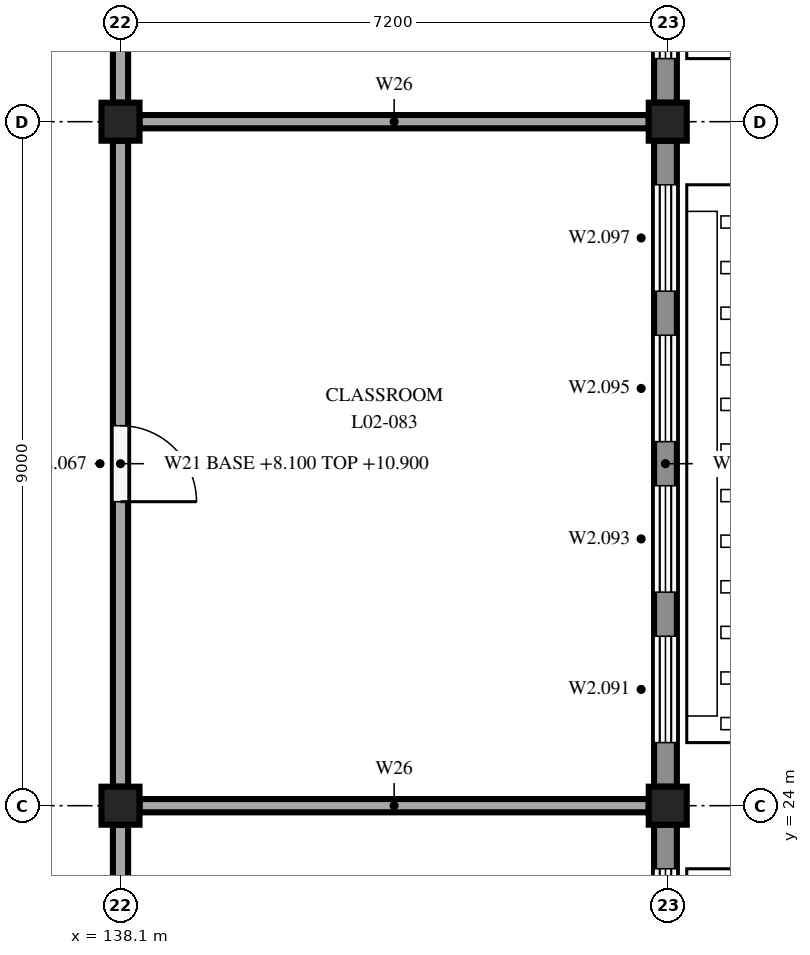
"""IFC4 building model, lengths in metres.
Left out: names, types, materials, properties, quantities, classifications, styles, units other than length and angle.
Written with IfcOpenShell. Run it as: python <this file> out.ifc"""

import sys

from ifc_helpers import new_model, si_unit, direction, frame, frame_2d, origin, origin_2d, place, context, subcontext, project, spatial, rectangle, extrude, element, fill, save


model = new_model("IFC4")
c1 = context("Model", 3, precision=1e-05, world=origin(), true_north=direction((0.0, 1.0)))
c2 = subcontext(c1, "Body", "Model", "MODEL_VIEW")
j1 = project(units=[si_unit("LENGTHUNIT", "METRE"), si_unit("PLANEANGLEUNIT", "RADIAN")], contexts=[c1])
p1 = place(None, origin())
s1 = spatial("IfcSite", under=j1, at=p1, CompositionType="ELEMENT")
p2 = place(p1, origin())
s2 = spatial("IfcBuilding", under=s1, at=p2, CompositionType="ELEMENT")
p3 = place(p2, frame((0.0, 0.0, 8.1)))
s3 = spatial("IfcBuildingStorey", under=s2, at=p3, CompositionType="ELEMENT", Elevation=8.1)
for number, where, z_axis, x_axis in (
    (1, (138.1, 24.0, 0.0), (0.0, 0.0, 1.0), (1.0, 0.0, 0.0)),
    (2, (138.1, 33.0, 0.0), (0.0, 0.0, 1.0), (1.0, 0.0, 0.0)),
    (3, (145.3, 24.0, 0.0), (0.0, 0.0, 1.0), (1.0, 0.0, 0.0)),
    (4, (145.3, 33.0, 0.0), (0.0, 0.0, 1.0), (1.0, 0.0, 0.0)),
):
    element("IfcColumn", number, at=place(p3, frame(where, z_axis=z_axis, x_axis=x_axis)), inside=s3, PredefinedType="COLUMN", context=c2, shape_type="SweptSolid", body=[
        extrude(rectangle(XDim=0.5, YDim=0.5, at=origin_2d()), origin(), (0.0, 0.0, 1.0), 3.3),
    ])
p4 = place(p3, frame((145.27, 23.75, 0.0), z_axis=(0.0, 0.0, 1.0), x_axis=(0.0, -1.0, 0.0)))
e5 = element("IfcWall", 5, at=p4, inside=s3, PredefinedType="STANDARD", context=c2, shape_type="SweptSolid", body=[
    extrude(rectangle(XDim=8.5, YDim=0.3, at=frame_2d((4.25, 0.0))), origin(), (0.0, 0.0, 1.0), 2.75),
])
p5 = place(p4, frame((6.52, 0.0, 0.6)))
e6 = element("IfcOpeningElement", 6, at=p5, cuts=e5, PredefinedType="OPENING", context=c2, shape_type="SweptSolid", body=[
    extrude(rectangle(XDim=1.4, YDim=2.1, at=frame_2d((0.7, 1.05))), frame((0.0, 0.16, 0.0), z_axis=(0.0, -1.0, 0.0), x_axis=(1.0, 0.0, 0.0)), (0.0, 0.0, 1.0), 0.32),
])
p6 = place(p4, frame((4.54, 0.0, 0.6)))
e7 = element("IfcOpeningElement", 7, at=p6, cuts=e5, PredefinedType="OPENING", context=c2, shape_type="SweptSolid", body=[
    extrude(rectangle(XDim=1.4, YDim=2.1, at=frame_2d((0.7, 1.05))), frame((0.0, 0.16, 0.0), z_axis=(0.0, -1.0, 0.0), x_axis=(1.0, 0.0, 0.0)), (0.0, 0.0, 1.0), 0.32),
])
p7 = place(p4, frame((2.56, 0.0, 0.6)))
e8 = element("IfcOpeningElement", 8, at=p7, cuts=e5, PredefinedType="OPENING", context=c2, shape_type="SweptSolid", body=[
    extrude(rectangle(XDim=1.4, YDim=2.1, at=frame_2d((0.7, 1.05))), frame((0.0, 0.16, 0.0), z_axis=(0.0, -1.0, 0.0), x_axis=(1.0, 0.0, 0.0)), (0.0, 0.0, 1.0), 0.32),
])
p8 = place(p4, frame((0.58, 0.0, 0.6)))
e9 = element("IfcOpeningElement", 9, at=p8, cuts=e5, PredefinedType="OPENING", context=c2, shape_type="SweptSolid", body=[
    extrude(rectangle(XDim=1.4, YDim=2.1, at=frame_2d((0.7, 1.05))), frame((0.0, 0.16, 0.0), z_axis=(0.0, -1.0, 0.0), x_axis=(1.0, 0.0, 0.0)), (0.0, 0.0, 1.0), 0.32),
])
p9 = place(p3, frame((145.27, 32.75, 0.0), z_axis=(0.0, 0.0, 1.0), x_axis=(0.0, -1.0, 0.0)))
e10 = element("IfcWall", 10, at=p9, inside=s3, PredefinedType="STANDARD", context=c2, shape_type="SweptSolid", body=[
    extrude(rectangle(XDim=8.5, YDim=0.3, at=frame_2d((4.25, 0.0))), origin(), (0.0, 0.0, 1.0), 2.75),
])
p10 = place(p9, frame((6.52, 0.0, 0.6)))
e11 = element("IfcOpeningElement", 11, at=p10, cuts=e10, PredefinedType="OPENING", context=c2, shape_type="SweptSolid", body=[
    extrude(rectangle(XDim=1.4, YDim=2.1, at=frame_2d((0.7, 1.05))), frame((0.0, 0.16, 0.0), z_axis=(0.0, -1.0, 0.0), x_axis=(1.0, 0.0, 0.0)), (0.0, 0.0, 1.0), 0.32),
])
p11 = place(p9, frame((4.54, 0.0, 0.6)))
e12 = element("IfcOpeningElement", 12, at=p11, cuts=e10, PredefinedType="OPENING", context=c2, shape_type="SweptSolid", body=[
    extrude(rectangle(XDim=1.4, YDim=2.1, at=frame_2d((0.7, 1.05))), frame((0.0, 0.16, 0.0), z_axis=(0.0, -1.0, 0.0), x_axis=(1.0, 0.0, 0.0)), (0.0, 0.0, 1.0), 0.32),
])
p12 = place(p9, frame((2.56, 0.0, 0.6)))
e13 = element("IfcOpeningElement", 13, at=p12, cuts=e10, PredefinedType="OPENING", context=c2, shape_type="SweptSolid", body=[
    extrude(rectangle(XDim=1.4, YDim=2.1, at=frame_2d((0.7, 1.05))), frame((0.0, 0.16, 0.0), z_axis=(0.0, -1.0, 0.0), x_axis=(1.0, 0.0, 0.0)), (0.0, 0.0, 1.0), 0.32),
])
p13 = place(p9, frame((0.58, 0.0, 0.6)))
e14 = element("IfcOpeningElement", 14, at=p13, cuts=e10, PredefinedType="OPENING", context=c2, shape_type="SweptSolid", body=[
    extrude(rectangle(XDim=1.4, YDim=2.1, at=frame_2d((0.7, 1.05))), frame((0.0, 0.16, 0.0), z_axis=(0.0, -1.0, 0.0), x_axis=(1.0, 0.0, 0.0)), (0.0, 0.0, 1.0), 0.32),
])
p14 = place(p3, frame((145.27, 41.75, 0.0), z_axis=(0.0, 0.0, 1.0), x_axis=(0.0, -1.0, 0.0)))
e15 = element("IfcWall", 15, at=p14, inside=s3, PredefinedType="STANDARD", context=c2, shape_type="SweptSolid", body=[
    extrude(rectangle(XDim=8.5, YDim=0.3, at=frame_2d((4.25, 0.0))), origin(), (0.0, 0.0, 1.0), 2.75),
])
p15 = place(p14, frame((6.52, 0.0, 0.6)))
e16 = element("IfcOpeningElement", 16, at=p15, cuts=e15, PredefinedType="OPENING", context=c2, shape_type="SweptSolid", body=[
    extrude(rectangle(XDim=1.4, YDim=2.1, at=frame_2d((0.7, 1.05))), frame((0.0, 0.16, 0.0), z_axis=(0.0, -1.0, 0.0), x_axis=(1.0, 0.0, 0.0)), (0.0, 0.0, 1.0), 0.32),
])
p16 = place(p14, frame((4.54, 0.0, 0.6)))
e17 = element("IfcOpeningElement", 17, at=p16, cuts=e15, PredefinedType="OPENING", context=c2, shape_type="SweptSolid", body=[
    extrude(rectangle(XDim=1.4, YDim=2.1, at=frame_2d((0.7, 1.05))), frame((0.0, 0.16, 0.0), z_axis=(0.0, -1.0, 0.0), x_axis=(1.0, 0.0, 0.0)), (0.0, 0.0, 1.0), 0.32),
])
p17 = place(p14, frame((2.56, 0.0, 0.6)))
e18 = element("IfcOpeningElement", 18, at=p17, cuts=e15, PredefinedType="OPENING", context=c2, shape_type="SweptSolid", body=[
    extrude(rectangle(XDim=1.4, YDim=2.1, at=frame_2d((0.7, 1.05))), frame((0.0, 0.16, 0.0), z_axis=(0.0, -1.0, 0.0), x_axis=(1.0, 0.0, 0.0)), (0.0, 0.0, 1.0), 0.32),
])
p18 = place(p14, frame((0.58, 0.0, 0.6)))
e19 = element("IfcOpeningElement", 19, at=p18, cuts=e15, PredefinedType="OPENING", context=c2, shape_type="SweptSolid", body=[
    extrude(rectangle(XDim=1.4, YDim=2.1, at=frame_2d((0.7, 1.05))), frame((0.0, 0.16, 0.0), z_axis=(0.0, -1.0, 0.0), x_axis=(1.0, 0.0, 0.0)), (0.0, 0.0, 1.0), 0.32),
])
p19 = place(p3, frame((138.1, 23.75, 0.0), z_axis=(0.0, 0.0, 1.0), x_axis=(0.0, -1.0, 0.0)))
e20 = element("IfcWall", 20, at=p19, inside=s3, PredefinedType="PARTITIONING", context=c2, shape_type="SweptSolid", body=[
    extrude(rectangle(XDim=8.5, YDim=0.2, at=frame_2d((4.25, 0.0))), origin(), (0.0, 0.0, 1.0), 2.8),
])
p20 = place(p19, frame((3.75, 0.0, 0.0)))
e21 = element("IfcOpeningElement", 21, at=p20, cuts=e20, PredefinedType="OPENING", context=c2, shape_type="SweptSolid", body=[
    extrude(rectangle(XDim=1.0, YDim=2.1, at=frame_2d((0.5, 1.05))), frame((0.0, 0.11, 0.0), z_axis=(0.0, -1.0, 0.0), x_axis=(1.0, 0.0, 0.0)), (0.0, 0.0, 1.0), 0.22),
])
p21 = place(p3, frame((138.1, 32.75, 0.0), z_axis=(0.0, 0.0, 1.0), x_axis=(0.0, -1.0, 0.0)))
e22 = element("IfcWall", 22, at=p21, inside=s3, PredefinedType="PARTITIONING", context=c2, shape_type="SweptSolid", body=[
    extrude(rectangle(XDim=8.5, YDim=0.2, at=frame_2d((4.25, 0.0))), origin(), (0.0, 0.0, 1.0), 2.8),
])
p22 = place(p21, frame((3.75, 0.0, 0.0)))
e23 = element("IfcOpeningElement", 23, at=p22, cuts=e22, PredefinedType="OPENING", context=c2, shape_type="SweptSolid", body=[
    extrude(rectangle(XDim=1.0, YDim=2.1, at=frame_2d((0.5, 1.05))), frame((0.0, 0.11, 0.0), z_axis=(0.0, -1.0, 0.0), x_axis=(1.0, 0.0, 0.0)), (0.0, 0.0, 1.0), 0.22),
])
p23 = place(p3, frame((138.1, 41.75, 0.0), z_axis=(0.0, 0.0, 1.0), x_axis=(0.0, -1.0, 0.0)))
e24 = element("IfcWall", 24, at=p23, inside=s3, PredefinedType="PARTITIONING", context=c2, shape_type="SweptSolid", body=[
    extrude(rectangle(XDim=8.5, YDim=0.2, at=frame_2d((4.25, 0.0))), origin(), (0.0, 0.0, 1.0), 2.8),
])
p24 = place(p23, frame((5.919, 0.0, 0.0)))
e25 = element("IfcOpeningElement", 25, at=p24, cuts=e24, PredefinedType="OPENING", context=c2, shape_type="SweptSolid", body=[
    extrude(rectangle(XDim=1.0, YDim=2.1, at=frame_2d((0.5, 1.05))), frame((0.0, 0.11, 0.0), z_axis=(0.0, -1.0, 0.0), x_axis=(1.0, 0.0, 0.0)), (0.0, 0.0, 1.0), 0.22),
])
p25 = place(p23, frame((1.581, 0.0, 0.0)))
e26 = element("IfcOpeningElement", 26, at=p25, cuts=e24, PredefinedType="OPENING", context=c2, shape_type="SweptSolid", body=[
    extrude(rectangle(XDim=1.0, YDim=2.1, at=frame_2d((0.5, 1.05))), frame((0.0, 0.11, 0.0), z_axis=(0.0, -1.0, 0.0), x_axis=(1.0, 0.0, 0.0)), (0.0, 0.0, 1.0), 0.22),
])
for number, where, z_axis, x_axis in (
    (27, (138.35, 24.0, 0.0), (0.0, 0.0, 1.0), (1.0, 0.0, 0.0)),
    (28, (138.35, 33.0, 0.0), (0.0, 0.0, 1.0), (1.0, 0.0, 0.0)),
):
    element("IfcWall", number, at=place(p3, frame(where, z_axis=z_axis, x_axis=x_axis)), inside=s3, PredefinedType="PARTITIONING", context=c2, shape_type="SweptSolid", body=[
        extrude(rectangle(XDim=6.7, YDim=0.175, at=frame_2d((3.35, 0.0))), origin(), (0.0, 0.0, 1.0), 2.8),
    ])
p26 = place(p8, origin())
e29 = element("IfcWindow", 29, at=p26, inside=s3, PartitioningType="DOUBLE_PANEL_VERTICAL", PredefinedType="WINDOW", context=c2, shape_type="SweptSolid", body=[
    extrude(rectangle(XDim=1.4, YDim=2.1, at=frame_2d((0.7, 1.05))), frame((0.0, 0.03, 0.0), z_axis=(0.0, -1.0, 0.0), x_axis=(1.0, 0.0, 0.0)), (0.0, 0.0, 1.0), 0.06),
])
fill(e9, e29)
p27 = place(p10, origin())
e30 = element("IfcWindow", 30, at=p27, inside=s3, PartitioningType="DOUBLE_PANEL_VERTICAL", PredefinedType="WINDOW", context=c2, shape_type="SweptSolid", body=[
    extrude(rectangle(XDim=1.4, YDim=2.1, at=frame_2d((0.7, 1.05))), frame((0.0, 0.03, 0.0), z_axis=(0.0, -1.0, 0.0), x_axis=(1.0, 0.0, 0.0)), (0.0, 0.0, 1.0), 0.06),
])
fill(e11, e30)
p28 = place(p11, origin())
e31 = element("IfcWindow", 31, at=p28, inside=s3, PartitioningType="DOUBLE_PANEL_VERTICAL", PredefinedType="WINDOW", context=c2, shape_type="SweptSolid", body=[
    extrude(rectangle(XDim=1.4, YDim=2.1, at=frame_2d((0.7, 1.05))), frame((0.0, 0.03, 0.0), z_axis=(0.0, -1.0, 0.0), x_axis=(1.0, 0.0, 0.0)), (0.0, 0.0, 1.0), 0.06),
])
fill(e12, e31)
p29 = place(p12, origin())
e32 = element("IfcWindow", 32, at=p29, inside=s3, PartitioningType="DOUBLE_PANEL_VERTICAL", PredefinedType="WINDOW", context=c2, shape_type="SweptSolid", body=[
    extrude(rectangle(XDim=1.4, YDim=2.1, at=frame_2d((0.7, 1.05))), frame((0.0, 0.03, 0.0), z_axis=(0.0, -1.0, 0.0), x_axis=(1.0, 0.0, 0.0)), (0.0, 0.0, 1.0), 0.06),
])
fill(e13, e32)
p30 = place(p13, origin())
e33 = element("IfcWindow", 33, at=p30, inside=s3, PartitioningType="DOUBLE_PANEL_VERTICAL", PredefinedType="WINDOW", context=c2, shape_type="SweptSolid", body=[
    extrude(rectangle(XDim=1.4, YDim=2.1, at=frame_2d((0.7, 1.05))), frame((0.0, 0.03, 0.0), z_axis=(0.0, -1.0, 0.0), x_axis=(1.0, 0.0, 0.0)), (0.0, 0.0, 1.0), 0.06),
])
fill(e14, e33)
p31 = place(p15, origin())
e34 = element("IfcWindow", 34, at=p31, inside=s3, PartitioningType="DOUBLE_PANEL_VERTICAL", PredefinedType="WINDOW", context=c2, shape_type="SweptSolid", body=[
    extrude(rectangle(XDim=1.4, YDim=2.1, at=frame_2d((0.7, 1.05))), frame((0.0, 0.03, 0.0), z_axis=(0.0, -1.0, 0.0), x_axis=(1.0, 0.0, 0.0)), (0.0, 0.0, 1.0), 0.06),
])
fill(e16, e34)
p32 = place(p22, origin())
e35 = element("IfcDoor", 35, at=p32, inside=s3, OperationType="SINGLE_SWING_RIGHT", PredefinedType="DOOR", context=c2, shape_type="SweptSolid", body=[
    extrude(rectangle(XDim=1.0, YDim=2.1, at=frame_2d((0.5, 1.05))), frame((0.0, 0.025, 0.0), z_axis=(0.0, -1.0, 0.0), x_axis=(1.0, 0.0, 0.0)), (0.0, 0.0, 1.0), 0.05),
])
fill(e23, e35)
save(model, sys.argv[1])
